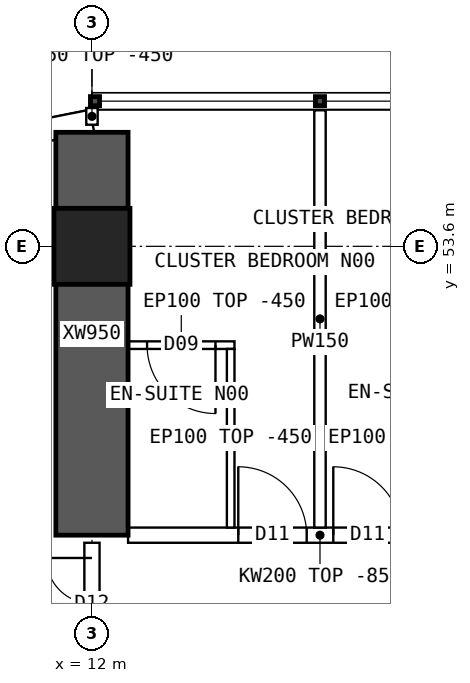
"""IFC4 building model, lengths in metres.
Left out: names, types, materials, properties, quantities, classifications, styles, units other than length and angle.
Written with IfcOpenShell. Run it as: python <this file> out.ifc"""

import sys

from ifc_helpers import new_model, si_unit, direction, frame, frame_2d, origin, origin_2d, place, context, subcontext, project, spatial, polyline, rectangle, hollow_rectangle, outline, extrude, element, fill, save


model = new_model("IFC4")
c1 = context("Model", 3, precision=1e-05, world=origin(), true_north=direction((0.0, 1.0)))
c2 = subcontext(c1, "Body", "Model", "MODEL_VIEW")
j1 = project(units=[si_unit("LENGTHUNIT", "METRE"), si_unit("PLANEANGLEUNIT", "RADIAN")], contexts=[c1])
p1 = place(None, origin())
s1 = spatial("IfcSite", under=j1, at=p1, CompositionType="ELEMENT")
p2 = place(p1, origin())
s2 = spatial("IfcBuilding", under=s1, at=p2, CompositionType="ELEMENT")
p3 = place(p2, frame((0.0, 0.0, 80.65)))
s3 = spatial("IfcBuildingStorey", under=s2, at=p3, CompositionType="ELEMENT", Elevation=80.65)
p4 = place(p3, frame((12.0, 53.6, 0.0), z_axis=(0.0, 0.0, 1.0), x_axis=(1.0, 0.0, 0.0)))
e1 = element("IfcColumn", 1, at=p4, inside=s3, PredefinedType="COLUMN", context=c2, shape_type="SweptSolid", body=[
    extrude(hollow_rectangle(XDim=1.0, YDim=1.0, WallThickness=0.1, at=origin_2d()), origin(), (0.0, 0.0, 1.0), 3.75),
])
p5 = place(p3, frame((12.0, 49.8, 0.0), z_axis=(0.0, 0.0, 1.0), x_axis=(0.0, 1.0, 0.0)))
e2 = element("IfcWall", 2, at=p5, inside=s3, PredefinedType="SHEAR", context=c2, shape_type="SweptSolid", body=[
    extrude(rectangle(XDim=5.3, YDim=0.95, at=frame_2d((2.65, 0.0))), origin(), (0.0, 0.0, 1.0), 3.75),
])
p6 = place(p3, frame((12.0, 55.25, 0.0), z_axis=(0.0, 0.0, 1.0), x_axis=(-0.980787251524, -0.195080412259, 0.0)))
e3 = element("IfcWall", 3, at=p6, inside=s3, PredefinedType="SOLIDWALL", context=c2, shape_type="SweptSolid", body=[
    extrude(outline(polyline([(-0.03, -0.15), (3.249, -0.15), (3.189, 0.15), (0.03, 0.15), (-0.03, -0.15)])), origin(), (0.0, 0.0, 1.0), 3.3),
])
p7 = place(p6, frame((0.909, 0.0, 0.9)))
e4 = element("IfcOpeningElement", 4, at=p7, cuts=e3, PredefinedType="OPENING", context=c2, shape_type="SweptSolid", body=[
    extrude(rectangle(XDim=1.4, YDim=1.8, at=frame_2d((0.7, 0.9))), frame((0.0, 0.16, 0.0), z_axis=(0.0, -1.0, 0.0), x_axis=(1.0, 0.0, 0.0)), (0.0, 0.0, 1.0), 0.32),
])
p8 = place(p3, frame((12.475, 49.8, 0.0), z_axis=(0.0, 0.0, 1.0), x_axis=(1.0, 0.0, 0.0)))
e5 = element("IfcWall", 5, at=p8, inside=s3, PredefinedType="SOLIDWALL", context=c2, shape_type="SweptSolid", body=[
    extrude(outline(polyline([(0.0, 0.0), (5.05, 0.0), (5.05, 2.9), (0.0, 2.9), (0.0, 0.0)])), frame((0.0, 0.1, 0.0), z_axis=(0.0, -1.0, 0.0), x_axis=(1.0, 0.0, 0.0)), (0.0, 0.0, 1.0), 0.2),
])
p9 = place(p8, frame((1.45, 0.0, 0.0)))
e6 = element("IfcOpeningElement", 6, at=p9, cuts=e5, PredefinedType="OPENING", context=c2, shape_type="SweptSolid", body=[
    extrude(rectangle(XDim=0.9, YDim=2.1, at=frame_2d((0.45, 1.05))), frame((0.0, 0.11, 0.0), z_axis=(0.0, -1.0, 0.0), x_axis=(1.0, 0.0, 0.0)), (0.0, 0.0, 1.0), 0.22),
])
p10 = place(p8, frame((2.7, 0.0, 0.0)))
e7 = element("IfcOpeningElement", 7, at=p10, cuts=e5, PredefinedType="OPENING", context=c2, shape_type="SweptSolid", body=[
    extrude(rectangle(XDim=0.9, YDim=2.1, at=frame_2d((0.45, 1.05))), frame((0.0, 0.11, 0.0), z_axis=(0.0, -1.0, 0.0), x_axis=(1.0, 0.0, 0.0)), (0.0, 0.0, 1.0), 0.22),
])
p11 = place(p3, frame((15.0, 55.39, 0.0), z_axis=(0.0, 0.0, 1.0), x_axis=(0.0, -1.0, 0.0)))
e8 = element("IfcWall", 8, at=p11, inside=s3, PredefinedType="PARTITIONING", context=c2, shape_type="SweptSolid", body=[
    extrude(outline(polyline([(0.0, 0.0), (5.49, 0.0), (5.49, 2.9), (5.442, 2.9), (5.44, 3.3), (1.992, 3.3), (1.99, 2.9), (1.592, 2.9), (1.59, 3.3), (0.0, 3.3), (0.0, 0.0)])), frame((0.0, 0.075, 0.0), z_axis=(0.0, -1.0, 0.0), x_axis=(1.0, 0.0, 0.0)), (0.0, 0.0, 1.0), 0.15),
])
p12 = place(p3, frame((12.475, 52.3, 0.0), z_axis=(0.0, 0.0, 1.0), x_axis=(1.0, 0.0, 0.0)))
e9 = element("IfcWall", 9, at=p12, inside=s3, PredefinedType="PARTITIONING", context=c2, shape_type="SweptSolid", body=[
    extrude(rectangle(XDim=1.4, YDim=0.1, at=frame_2d((0.7, 0.0))), origin(), (0.0, 0.0, 1.0), 3.3),
])
p13 = place(p12, frame((0.25, 0.0, 0.0)))
e10 = element("IfcOpeningElement", 10, at=p13, cuts=e9, PredefinedType="OPENING", context=c2, shape_type="SweptSolid", body=[
    extrude(rectangle(XDim=0.9, YDim=2.1, at=frame_2d((0.45, 1.05))), frame((0.0, 0.06, 0.0), z_axis=(0.0, -1.0, 0.0), x_axis=(1.0, 0.0, 0.0)), (0.0, 0.0, 1.0), 0.12),
])
p14 = place(p3, frame((13.825, 52.25, 0.0), z_axis=(0.0, 0.0, 1.0), x_axis=(0.0, -1.0, 0.0)))
e11 = element("IfcWall", 11, at=p14, inside=s3, PredefinedType="PARTITIONING", context=c2, shape_type="SweptSolid", body=[
    extrude(outline(polyline([(0.0, 0.0), (2.35, 0.0), (2.35, 2.9), (2.302, 2.9), (2.3, 3.3), (0.0, 3.3), (0.0, 0.0)])), frame((0.0, 0.05, 0.0), z_axis=(0.0, -1.0, 0.0), x_axis=(1.0, 0.0, 0.0)), (0.0, 0.0, 1.0), 0.1),
])
p15 = place(p3, frame((12.0, 48.1, 0.0), z_axis=(0.0, 0.0, 1.0), x_axis=(0.0, 1.0, 0.0)))
e12 = element("IfcWall", 12, at=p15, inside=s3, PredefinedType="SOLIDWALL", context=c2, shape_type="SweptSolid", body=[
    extrude(outline(polyline([(0.0, 0.0), (1.6, 0.0), (1.6, 2.9), (0.0, 2.9), (0.0, 0.0)])), frame((0.0, 0.1, 0.0), z_axis=(0.0, -1.0, 0.0), x_axis=(1.0, 0.0, 0.0)), (0.0, 0.0, 1.0), 0.2),
])
p16 = place(p15, frame((0.2, 0.0, 0.0)))
e13 = element("IfcOpeningElement", 13, at=p16, cuts=e12, PredefinedType="OPENING", context=c2, shape_type="SweptSolid", body=[
    extrude(rectangle(XDim=1.2, YDim=2.1, at=frame_2d((0.6, 1.05))), frame((0.0, 0.11, 0.0), z_axis=(0.0, -1.0, 0.0), x_axis=(1.0, 0.0, 0.0)), (0.0, 0.0, 1.0), 0.22),
])
p17 = place(p3, frame((12.0, 55.2, 0.0), z_axis=(0.0, 0.0, 1.0), x_axis=(0.0, 1.0, 0.0)))
e14 = element("IfcWall", 14, at=p17, inside=s3, PredefinedType="PARTITIONING", context=c2, shape_type="SweptSolid", body=[
    extrude(rectangle(XDim=0.22, YDim=0.15, at=frame_2d((0.11, 0.0))), origin(), (0.0, 0.0, 1.0), 3.3),
])
p18 = place(p13, origin())
e15 = element("IfcDoor", 15, at=p18, inside=s3, OperationType="SINGLE_SWING_RIGHT", PredefinedType="DOOR", context=c2, shape_type="SweptSolid", body=[
    extrude(rectangle(XDim=0.9, YDim=2.1, at=frame_2d((0.45, 1.05))), frame((0.0, 0.025, 0.0), z_axis=(0.0, -1.0, 0.0), x_axis=(1.0, 0.0, 0.0)), (0.0, 0.0, 1.0), 0.05),
])
fill(e10, e15)
p19 = place(p9, origin())
e16 = element("IfcDoor", 16, at=p19, inside=s3, OperationType="SINGLE_SWING_LEFT", PredefinedType="DOOR", context=c2, shape_type="SweptSolid", body=[
    extrude(rectangle(XDim=0.9, YDim=2.1, at=frame_2d((0.45, 1.05))), frame((0.0, 0.025, 0.0), z_axis=(0.0, -1.0, 0.0), x_axis=(1.0, 0.0, 0.0)), (0.0, 0.0, 1.0), 0.05),
])
fill(e6, e16)
p20 = place(p10, origin())
e17 = element("IfcDoor", 17, at=p20, inside=s3, OperationType="SINGLE_SWING_LEFT", PredefinedType="DOOR", context=c2, shape_type="SweptSolid", body=[
    extrude(rectangle(XDim=0.9, YDim=2.1, at=frame_2d((0.45, 1.05))), frame((0.0, 0.025, 0.0), z_axis=(0.0, -1.0, 0.0), x_axis=(1.0, 0.0, 0.0)), (0.0, 0.0, 1.0), 0.05),
])
fill(e7, e17)
p21 = place(p16, origin())
e18 = element("IfcDoor", 18, at=p21, inside=s3, OperationType="DOUBLE_DOOR_SINGLE_SWING", PredefinedType="DOOR", context=c2, shape_type="SweptSolid", body=[
    extrude(rectangle(XDim=1.2, YDim=2.1, at=frame_2d((0.6, 1.05))), frame((0.0, 0.025, 0.0), z_axis=(0.0, -1.0, 0.0), x_axis=(1.0, 0.0, 0.0)), (0.0, 0.0, 1.0), 0.05),
])
fill(e13, e18)
save(model, sys.argv[1])
